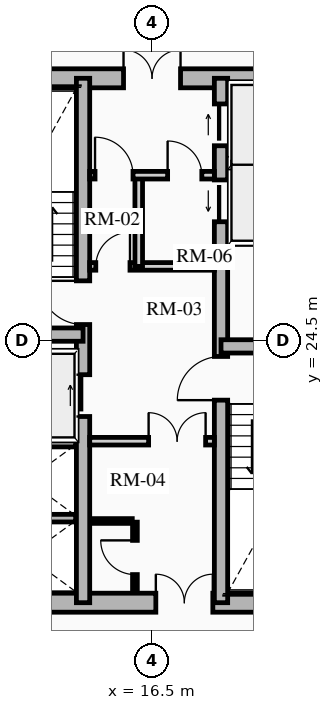
"""IFC4 building model, lengths in metres.
Left out: names, types, materials, properties, quantities, classifications, styles, units other than length and angle.
Written with IfcOpenShell. Run it as: python <this file> out.ifc"""

import sys

from ifc_helpers import new_model, si_unit, direction, frame, frame_2d, origin, place, context, subcontext, project, spatial, rectangle, extrude, source, transform, mapped, element, fill, save


model = new_model("IFC4")
c1 = context("Model", 3, precision=1e-05, world=origin(), true_north=direction((0.0, 1.0)))
c2 = subcontext(c1, "Body", "Model", "MODEL_VIEW")
j1 = project(units=[si_unit("LENGTHUNIT", "METRE"), si_unit("PLANEANGLEUNIT", "RADIAN")], contexts=[c1])
p1 = place(None, origin())
s1 = spatial("IfcSite", under=j1, at=p1, CompositionType="ELEMENT")
p2 = place(p1, origin())
s2 = spatial("IfcBuilding", under=s1, at=p2, CompositionType="ELEMENT")
p3 = place(p2, frame((0.0, 0.0, 56.92)))
s3 = spatial("IfcBuildingStorey", under=s2, at=p3, CompositionType="ELEMENT", Elevation=56.92)
p4 = place(p3, frame((11.15, 17.6, 0.0), z_axis=(0.0, 0.0, 1.0), x_axis=(1.0, 0.0, 0.0)))
e1 = element("IfcWall", 1, at=p4, inside=s3, PredefinedType="SHEAR", context=c2, shape_type="SweptSolid", body=[
    extrude(rectangle(XDim=10.7, YDim=0.5, at=frame_2d((5.35, 0.0))), origin(), (0.0, 0.0, 1.0), 2.91),
])
m1 = source(origin(), c2, "Body", "SweptSolid", [
    extrude(rectangle(XDim=1.5, YDim=2.02, at=frame_2d((0.75, 1.01))), frame((0.0, 0.26, 0.0), z_axis=(0.0, -1.0, 0.0), x_axis=(1.0, 0.0, 0.0)), (0.0, 0.0, 1.0), 0.52),
])
p5 = place(p4, frame((5.45, 0.0, 0.0)))
e2 = element("IfcOpeningElement", 2, at=p5, cuts=e1, PredefinedType="OPENING", context=c2, shape_type="MappedRepresentation", body=[
    mapped(m1, transform((0.0, 0.0, 0.0), x_axis=(1.0, 0.0, 0.0), y_axis=(0.0, 1.0, 0.0), z_axis=(0.0, 0.0, 1.0), scale=1.0)),
])
p6 = place(p3, frame((11.15, 31.4, 0.0), z_axis=(0.0, 0.0, 1.0), x_axis=(1.0, 0.0, 0.0)))
e3 = element("IfcWall", 3, at=p6, inside=s3, PredefinedType="SHEAR", context=c2, shape_type="SweptSolid", body=[
    extrude(rectangle(XDim=10.7, YDim=0.5, at=frame_2d((5.35, 0.0))), origin(), (0.0, 0.0, 1.0), 2.91),
])
p7 = place(p6, frame((4.6, 0.0, 0.0)))
e4 = element("IfcOpeningElement", 4, at=p7, cuts=e3, PredefinedType="OPENING", context=c2, shape_type="MappedRepresentation", body=[
    mapped(m1, transform((0.0, 0.0, 0.0), x_axis=(1.0, 0.0, 0.0), y_axis=(0.0, 1.0, 0.0), z_axis=(0.0, 0.0, 1.0), scale=1.0)),
])
p8 = place(p3, frame((14.685, 17.6, 0.0), z_axis=(0.0, 0.0, 1.0), x_axis=(0.0, 1.0, 0.0)))
e5 = element("IfcWall", 5, at=p8, inside=s3, PredefinedType="SHEAR", context=c2, shape_type="SweptSolid", body=[
    extrude(rectangle(XDim=13.8, YDim=0.35, at=frame_2d((6.9, 0.0))), origin(), (0.0, 0.0, 1.0), 2.91),
])
m2 = source(origin(), c2, "Body", "SweptSolid", [
    extrude(rectangle(XDim=1.1, YDim=2.015, at=frame_2d((0.55, 1.007))), frame((0.0, 0.185, 0.0), z_axis=(0.0, -1.0, 0.0), x_axis=(1.0, 0.0, 0.0)), (0.0, 0.0, 1.0), 0.37),
])
p9 = place(p8, frame((4.9, 0.0, 0.0)))
e6 = element("IfcOpeningElement", 6, at=p9, cuts=e5, PredefinedType="OPENING", context=c2, shape_type="MappedRepresentation", body=[
    mapped(m2, transform((0.0, 0.0, 0.0), x_axis=(1.0, 0.0, 0.0), y_axis=(0.0, 1.0, 0.0), z_axis=(0.0, 0.0, 1.0), scale=1.0)),
])
m3 = source(origin(), c2, "Body", "SweptSolid", [
    extrude(rectangle(XDim=1.15, YDim=2.02, at=frame_2d((0.575, 1.01))), frame((0.0, 0.185, 0.0), z_axis=(0.0, -1.0, 0.0), x_axis=(1.0, 0.0, 0.0)), (0.0, 0.0, 1.0), 0.37),
])
p10 = place(p8, frame((7.32, 0.0, 0.0)))
e7 = element("IfcOpeningElement", 7, at=p10, cuts=e5, PredefinedType="OPENING", context=c2, shape_type="MappedRepresentation", body=[
    mapped(m3, transform((0.0, 0.0, 0.0), x_axis=(1.0, 0.0, 0.0), y_axis=(0.0, 1.0, 0.0), z_axis=(0.0, 0.0, 1.0), scale=1.0)),
])
p11 = place(p3, frame((18.315, 17.6, 0.0), z_axis=(0.0, 0.0, 1.0), x_axis=(0.0, 1.0, 0.0)))
e8 = element("IfcWall", 8, at=p11, inside=s3, PredefinedType="SHEAR", context=c2, shape_type="SweptSolid", body=[
    extrude(rectangle(XDim=13.8, YDim=0.35, at=frame_2d((6.9, 0.0))), origin(), (0.0, 0.0, 1.0), 2.91),
])
p12 = place(p11, frame((10.025, 0.0, 0.0)))
e9 = element("IfcOpeningElement", 9, at=p12, cuts=e8, PredefinedType="OPENING", context=c2, shape_type="MappedRepresentation", body=[
    mapped(m2, transform((0.0, 0.0, 0.0), x_axis=(1.0, 0.0, 0.0), y_axis=(0.0, 1.0, 0.0), z_axis=(0.0, 0.0, 1.0), scale=1.0)),
])
p13 = place(p11, frame((12.025, 0.0, 0.0)))
e10 = element("IfcOpeningElement", 10, at=p13, cuts=e8, PredefinedType="OPENING", context=c2, shape_type="MappedRepresentation", body=[
    mapped(m2, transform((0.0, 0.0, 0.0), x_axis=(1.0, 0.0, 0.0), y_axis=(0.0, 1.0, 0.0), z_axis=(0.0, 0.0, 1.0), scale=1.0)),
])
p14 = place(p11, frame((5.33, 0.0, 0.0)))
e11 = element("IfcOpeningElement", 11, at=p14, cuts=e8, PredefinedType="OPENING", context=c2, shape_type="MappedRepresentation", body=[
    mapped(m3, transform((0.0, 0.0, 0.0), x_axis=(1.0, 0.0, 0.0), y_axis=(0.0, 1.0, 0.0), z_axis=(0.0, 0.0, 1.0), scale=1.0)),
])
for number, where, z_axis, x_axis in (
    (12, (11.4, 24.655, 0.0), (0.0, 0.0, 1.0), (1.0, 0.0, 0.0)),
    (13, (18.315, 24.345, 0.0), (0.0, 0.0, 1.0), (1.0, 0.0, 0.0)),
):
    element("IfcWall", number, at=place(p3, frame(where, z_axis=z_axis, x_axis=x_axis)), inside=s3, PredefinedType="SHEAR", context=c2, shape_type="SweptSolid", body=[
        extrude(rectangle(XDim=3.285, YDim=0.35, at=frame_2d((1.643, 0.0))), origin(), (0.0, 0.0, 1.0), 2.91),
    ])
for number, where, z_axis, x_axis in (
    (14, (11.52, 21.8, 0.0), (0.0, 0.0, 1.0), (1.0, 0.0, 0.0)),
    (15, (11.52, 19.825, 0.0), (0.0, 0.0, 1.0), (1.0, 0.0, 0.0)),
    (16, (18.51, 27.13, 0.0), (0.0, 0.0, 1.0), (1.0, 0.0, 0.0)),
    (17, (18.51, 29.175, 0.0), (0.0, 0.0, 1.0), (1.0, 0.0, 0.0)),
):
    element("IfcWall", number, at=place(p3, frame(where, z_axis=z_axis, x_axis=x_axis)), inside=s3, PredefinedType="SHEAR", context=c2, shape_type="SweptSolid", body=[
        extrude(rectangle(XDim=2.97, YDim=0.2, at=frame_2d((1.485, 0.0))), origin(), (0.0, 0.0, 1.0), 2.91),
    ])
p15 = place(p3, frame((14.86, 21.85, 0.0), z_axis=(0.0, 0.0, 1.0), x_axis=(1.0, 0.0, 0.0)))
e18 = element("IfcWall", 18, at=p15, inside=s3, PredefinedType="PARTITIONING", context=c2, shape_type="SweptSolid", body=[
    extrude(rectangle(XDim=3.28, YDim=0.2, at=frame_2d((1.64, 0.0))), origin(), (0.0, 0.0, 1.0), 2.635),
])
m4 = source(origin(), c2, "Body", "SweptSolid", [
    extrude(rectangle(XDim=1.5, YDim=2.02, at=frame_2d((0.75, 1.01))), frame((0.0, 0.11, 0.0), z_axis=(0.0, -1.0, 0.0), x_axis=(1.0, 0.0, 0.0)), (0.0, 0.0, 1.0), 0.22),
])
p16 = place(p15, frame((1.55, 0.0, 0.0)))
e19 = element("IfcOpeningElement", 19, at=p16, cuts=e18, PredefinedType="OPENING", context=c2, shape_type="MappedRepresentation", body=[
    mapped(m4, transform((0.0, 0.0, 0.0), x_axis=(1.0, 0.0, 0.0), y_axis=(0.0, 1.0, 0.0), z_axis=(0.0, 0.0, 1.0), scale=1.0)),
])
p17 = place(p3, frame((14.86, 26.45, 0.0), z_axis=(0.0, 0.0, 1.0), x_axis=(1.0, 0.0, 0.0)))
e20 = element("IfcWall", 20, at=p17, inside=s3, PredefinedType="PARTITIONING", context=c2, shape_type="SweptSolid", body=[
    extrude(rectangle(XDim=3.28, YDim=0.2, at=frame_2d((1.64, 0.0))), origin(), (0.0, 0.0, 1.0), 2.635),
])
m5 = source(origin(), c2, "Body", "SweptSolid", [
    extrude(rectangle(XDim=0.9, YDim=2.005, at=frame_2d((0.45, 1.002))), frame((0.0, 0.11, 0.0), z_axis=(0.0, -1.0, 0.0), x_axis=(1.0, 0.0, 0.0)), (0.0, 0.0, 1.0), 0.22),
])
p18 = place(p17, frame((0.16, 0.0, 0.0)))
e21 = element("IfcOpeningElement", 21, at=p18, cuts=e20, PredefinedType="OPENING", context=c2, shape_type="MappedRepresentation", body=[
    mapped(m5, transform((0.0, 0.0, 0.0), x_axis=(1.0, 0.0, 0.0), y_axis=(0.0, 1.0, 0.0), z_axis=(0.0, 0.0, 1.0), scale=1.0)),
])
p19 = place(p3, frame((16.15, 26.45, 0.0), z_axis=(0.0, 0.0, 1.0), x_axis=(0.0, 1.0, 0.0)))
e22 = element("IfcWall", 22, at=p19, inside=s3, PredefinedType="PARTITIONING", context=c2, shape_type="SweptSolid", body=[
    extrude(rectangle(XDim=2.4, YDim=0.2, at=frame_2d((1.2, 0.0))), origin(), (0.0, 0.0, 1.0), 2.635),
])
p20 = place(p3, frame((14.86, 28.85, 0.0), z_axis=(0.0, 0.0, 1.0), x_axis=(1.0, 0.0, 0.0)))
e23 = element("IfcWall", 23, at=p20, inside=s3, PredefinedType="PARTITIONING", context=c2, shape_type="SweptSolid", body=[
    extrude(rectangle(XDim=3.28, YDim=0.2, at=frame_2d((1.64, 0.0))), origin(), (0.0, 0.0, 1.0), 2.635),
])
m6 = source(origin(), c2, "Body", "SweptSolid", [
    extrude(rectangle(XDim=1.0, YDim=2.015, at=frame_2d((0.5, 1.007))), frame((0.0, 0.11, 0.0), z_axis=(0.0, -1.0, 0.0), x_axis=(1.0, 0.0, 0.0)), (0.0, 0.0, 1.0), 0.22),
])
p21 = place(p20, frame((0.14, 0.0, 0.0)))
e24 = element("IfcOpeningElement", 24, at=p21, cuts=e23, PredefinedType="OPENING", context=c2, shape_type="MappedRepresentation", body=[
    mapped(m6, transform((0.0, 0.0, 0.0), x_axis=(1.0, 0.0, 0.0), y_axis=(0.0, 1.0, 0.0), z_axis=(0.0, 0.0, 1.0), scale=1.0)),
])
p22 = place(p20, frame((2.05, 0.0, 0.0)))
e25 = element("IfcOpeningElement", 25, at=p22, cuts=e23, PredefinedType="OPENING", context=c2, shape_type="MappedRepresentation", body=[
    mapped(m5, transform((0.0, 0.0, 0.0), x_axis=(1.0, 0.0, 0.0), y_axis=(0.0, 1.0, 0.0), z_axis=(0.0, 0.0, 1.0), scale=1.0)),
])
p23 = place(p3, frame((16.05, 17.92, 0.0), z_axis=(0.0, 0.0, 1.0), x_axis=(0.0, 1.0, 0.0)))
e26 = element("IfcWall", 26, at=p23, inside=s3, PredefinedType="PARTITIONING", context=c2, shape_type="SweptSolid", body=[
    extrude(rectangle(XDim=1.8, YDim=0.125, at=frame_2d((0.9, 0.0))), origin(), (0.0, 0.0, 1.0), 2.635),
])
m7 = source(origin(), c2, "Body", "SweptSolid", [
    extrude(rectangle(XDim=0.9, YDim=2.005, at=frame_2d((0.45, 1.002))), frame((0.0, 0.073, 0.0), z_axis=(0.0, -1.0, 0.0), x_axis=(1.0, 0.0, 0.0)), (0.0, 0.0, 1.0), 0.145),
])
p24 = place(p23, frame((0.42, 0.0, 0.0)))
e27 = element("IfcOpeningElement", 27, at=p24, cuts=e26, PredefinedType="OPENING", context=c2, shape_type="MappedRepresentation", body=[
    mapped(m7, transform((0.0, 0.0, 0.0), x_axis=(1.0, 0.0, 0.0), y_axis=(0.0, 1.0, 0.0), z_axis=(0.0, 0.0, 1.0), scale=1.0)),
])
p25 = place(p3, frame((14.88, 19.75, 0.0), z_axis=(0.0, 0.0, 1.0), x_axis=(1.0, 0.0, 0.0)))
e28 = element("IfcWall", 28, at=p25, inside=s3, PredefinedType="PARTITIONING", context=c2, shape_type="SweptSolid", body=[
    extrude(rectangle(XDim=1.1, YDim=0.125, at=frame_2d((0.55, 0.0))), origin(), (0.0, 0.0, 1.0), 2.635),
])
m8 = source(origin(), c2, "Body", "SweptSolid", [
    extrude(rectangle(XDim=1.1, YDim=2.015, at=frame_2d((0.55, 1.007))), frame((0.0, 0.025, 0.0), z_axis=(0.0, -1.0, 0.0), x_axis=(1.0, 0.0, 0.0)), (0.0, 0.0, 1.0), 0.05),
])
p26 = place(p9, origin())
e29 = element("IfcDoor", 29, at=p26, inside=s3, OperationType="SLIDING_TO_RIGHT", PredefinedType="DOOR", context=c2, shape_type="MappedRepresentation", body=[
    mapped(m8, transform((0.0, 0.0, 0.0), x_axis=(1.0, 0.0, 0.0), y_axis=(0.0, 1.0, 0.0), z_axis=(0.0, 0.0, 1.0), scale=1.0)),
])
fill(e6, e29)
p27 = place(p12, origin())
e30 = element("IfcDoor", 30, at=p27, inside=s3, OperationType="SLIDING_TO_LEFT", PredefinedType="DOOR", context=c2, shape_type="MappedRepresentation", body=[
    mapped(m8, transform((0.0, 0.0, 0.0), x_axis=(1.0, 0.0, 0.0), y_axis=(0.0, 1.0, 0.0), z_axis=(0.0, 0.0, 1.0), scale=1.0)),
])
fill(e9, e30)
p28 = place(p13, origin())
e31 = element("IfcDoor", 31, at=p28, inside=s3, OperationType="SLIDING_TO_RIGHT", PredefinedType="DOOR", context=c2, shape_type="MappedRepresentation", body=[
    mapped(m8, transform((0.0, 0.0, 0.0), x_axis=(1.0, 0.0, 0.0), y_axis=(0.0, 1.0, 0.0), z_axis=(0.0, 0.0, 1.0), scale=1.0)),
])
fill(e10, e31)
m9 = source(origin(), c2, "Body", "SweptSolid", [
    extrude(rectangle(XDim=1.15, YDim=2.02, at=frame_2d((0.575, 1.01))), frame((0.0, 0.025, 0.0), z_axis=(0.0, -1.0, 0.0), x_axis=(1.0, 0.0, 0.0)), (0.0, 0.0, 1.0), 0.05),
])
p29 = place(p10, origin())
e32 = element("IfcDoor", 32, at=p29, inside=s3, OperationType="SINGLE_SWING_RIGHT", PredefinedType="DOOR", context=c2, shape_type="MappedRepresentation", body=[
    mapped(m9, transform((0.0, 0.0, 0.0), x_axis=(1.0, 0.0, 0.0), y_axis=(0.0, 1.0, 0.0), z_axis=(0.0, 0.0, 1.0), scale=1.0)),
])
fill(e7, e32)
p30 = place(p14, origin())
e33 = element("IfcDoor", 33, at=p30, inside=s3, OperationType="SINGLE_SWING_LEFT", PredefinedType="DOOR", context=c2, shape_type="MappedRepresentation", body=[
    mapped(m9, transform((0.0, 0.0, 0.0), x_axis=(1.0, 0.0, 0.0), y_axis=(0.0, 1.0, 0.0), z_axis=(0.0, 0.0, 1.0), scale=1.0)),
])
fill(e11, e33)
m10 = source(origin(), c2, "Body", "SweptSolid", [
    extrude(rectangle(XDim=1.5, YDim=2.02, at=frame_2d((0.75, 1.01))), frame((0.0, 0.025, 0.0), z_axis=(0.0, -1.0, 0.0), x_axis=(1.0, 0.0, 0.0)), (0.0, 0.0, 1.0), 0.05),
])
p31 = place(p7, origin())
e34 = element("IfcDoor", 34, at=p31, inside=s3, OperationType="DOUBLE_DOOR_SINGLE_SWING", PredefinedType="DOOR", context=c2, shape_type="MappedRepresentation", body=[
    mapped(m10, transform((0.0, 0.0, 0.0), x_axis=(1.0, 0.0, 0.0), y_axis=(0.0, 1.0, 0.0), z_axis=(0.0, 0.0, 1.0), scale=1.0)),
])
fill(e4, e34)
p32 = place(p5, origin())
e35 = element("IfcDoor", 35, at=p32, inside=s3, OperationType="DOUBLE_DOOR_SINGLE_SWING", PredefinedType="DOOR", context=c2, shape_type="MappedRepresentation", body=[
    mapped(m10, transform((0.0, 0.0, 0.0), x_axis=(1.0, 0.0, 0.0), y_axis=(0.0, 1.0, 0.0), z_axis=(0.0, 0.0, 1.0), scale=1.0)),
])
fill(e2, e35)
p33 = place(p16, origin())
e36 = element("IfcDoor", 36, at=p33, inside=s3, OperationType="DOUBLE_DOOR_SINGLE_SWING", PredefinedType="DOOR", context=c2, shape_type="MappedRepresentation", body=[
    mapped(m10, transform((0.0, 0.0, 0.0), x_axis=(1.0, 0.0, 0.0), y_axis=(0.0, 1.0, 0.0), z_axis=(0.0, 0.0, 1.0), scale=1.0)),
])
fill(e19, e36)
m11 = source(origin(), c2, "Body", "SweptSolid", [
    extrude(rectangle(XDim=0.9, YDim=2.005, at=frame_2d((0.45, 1.002))), frame((0.0, 0.025, 0.0), z_axis=(0.0, -1.0, 0.0), x_axis=(1.0, 0.0, 0.0)), (0.0, 0.0, 1.0), 0.05),
])
p34 = place(p18, origin())
e37 = element("IfcDoor", 37, at=p34, inside=s3, OperationType="SINGLE_SWING_RIGHT", PredefinedType="DOOR", context=c2, shape_type="MappedRepresentation", body=[
    mapped(m11, transform((0.0, 0.0, 0.0), x_axis=(1.0, 0.0, 0.0), y_axis=(0.0, 1.0, 0.0), z_axis=(0.0, 0.0, 1.0), scale=1.0)),
])
fill(e21, e37)
m12 = source(origin(), c2, "Body", "SweptSolid", [
    extrude(rectangle(XDim=1.0, YDim=2.015, at=frame_2d((0.5, 1.007))), frame((0.0, 0.025, 0.0), z_axis=(0.0, -1.0, 0.0), x_axis=(1.0, 0.0, 0.0)), (0.0, 0.0, 1.0), 0.05),
])
p35 = place(p21, origin())
e38 = element("IfcDoor", 38, at=p35, inside=s3, OperationType="SINGLE_SWING_LEFT", PredefinedType="DOOR", context=c2, shape_type="MappedRepresentation", body=[
    mapped(m12, transform((0.0, 0.0, 0.0), x_axis=(1.0, 0.0, 0.0), y_axis=(0.0, 1.0, 0.0), z_axis=(0.0, 0.0, 1.0), scale=1.0)),
])
fill(e24, e38)
p36 = place(p24, origin())
e39 = element("IfcDoor", 39, at=p36, inside=s3, OperationType="SINGLE_SWING_RIGHT", PredefinedType="DOOR", context=c2, shape_type="MappedRepresentation", body=[
    mapped(m11, transform((0.0, 0.0, 0.0), x_axis=(1.0, 0.0, 0.0), y_axis=(0.0, 1.0, 0.0), z_axis=(0.0, 0.0, 1.0), scale=1.0)),
])
fill(e27, e39)
p37 = place(p22, origin())
e40 = element("IfcDoor", 40, at=p37, inside=s3, OperationType="SINGLE_SWING_LEFT", PredefinedType="DOOR", context=c2, shape_type="MappedRepresentation", body=[
    mapped(m11, transform((0.0, 0.0, 0.0), x_axis=(1.0, 0.0, 0.0), y_axis=(0.0, 1.0, 0.0), z_axis=(0.0, 0.0, 1.0), scale=1.0)),
])
fill(e25, e40)
save(model, sys.argv[1])
